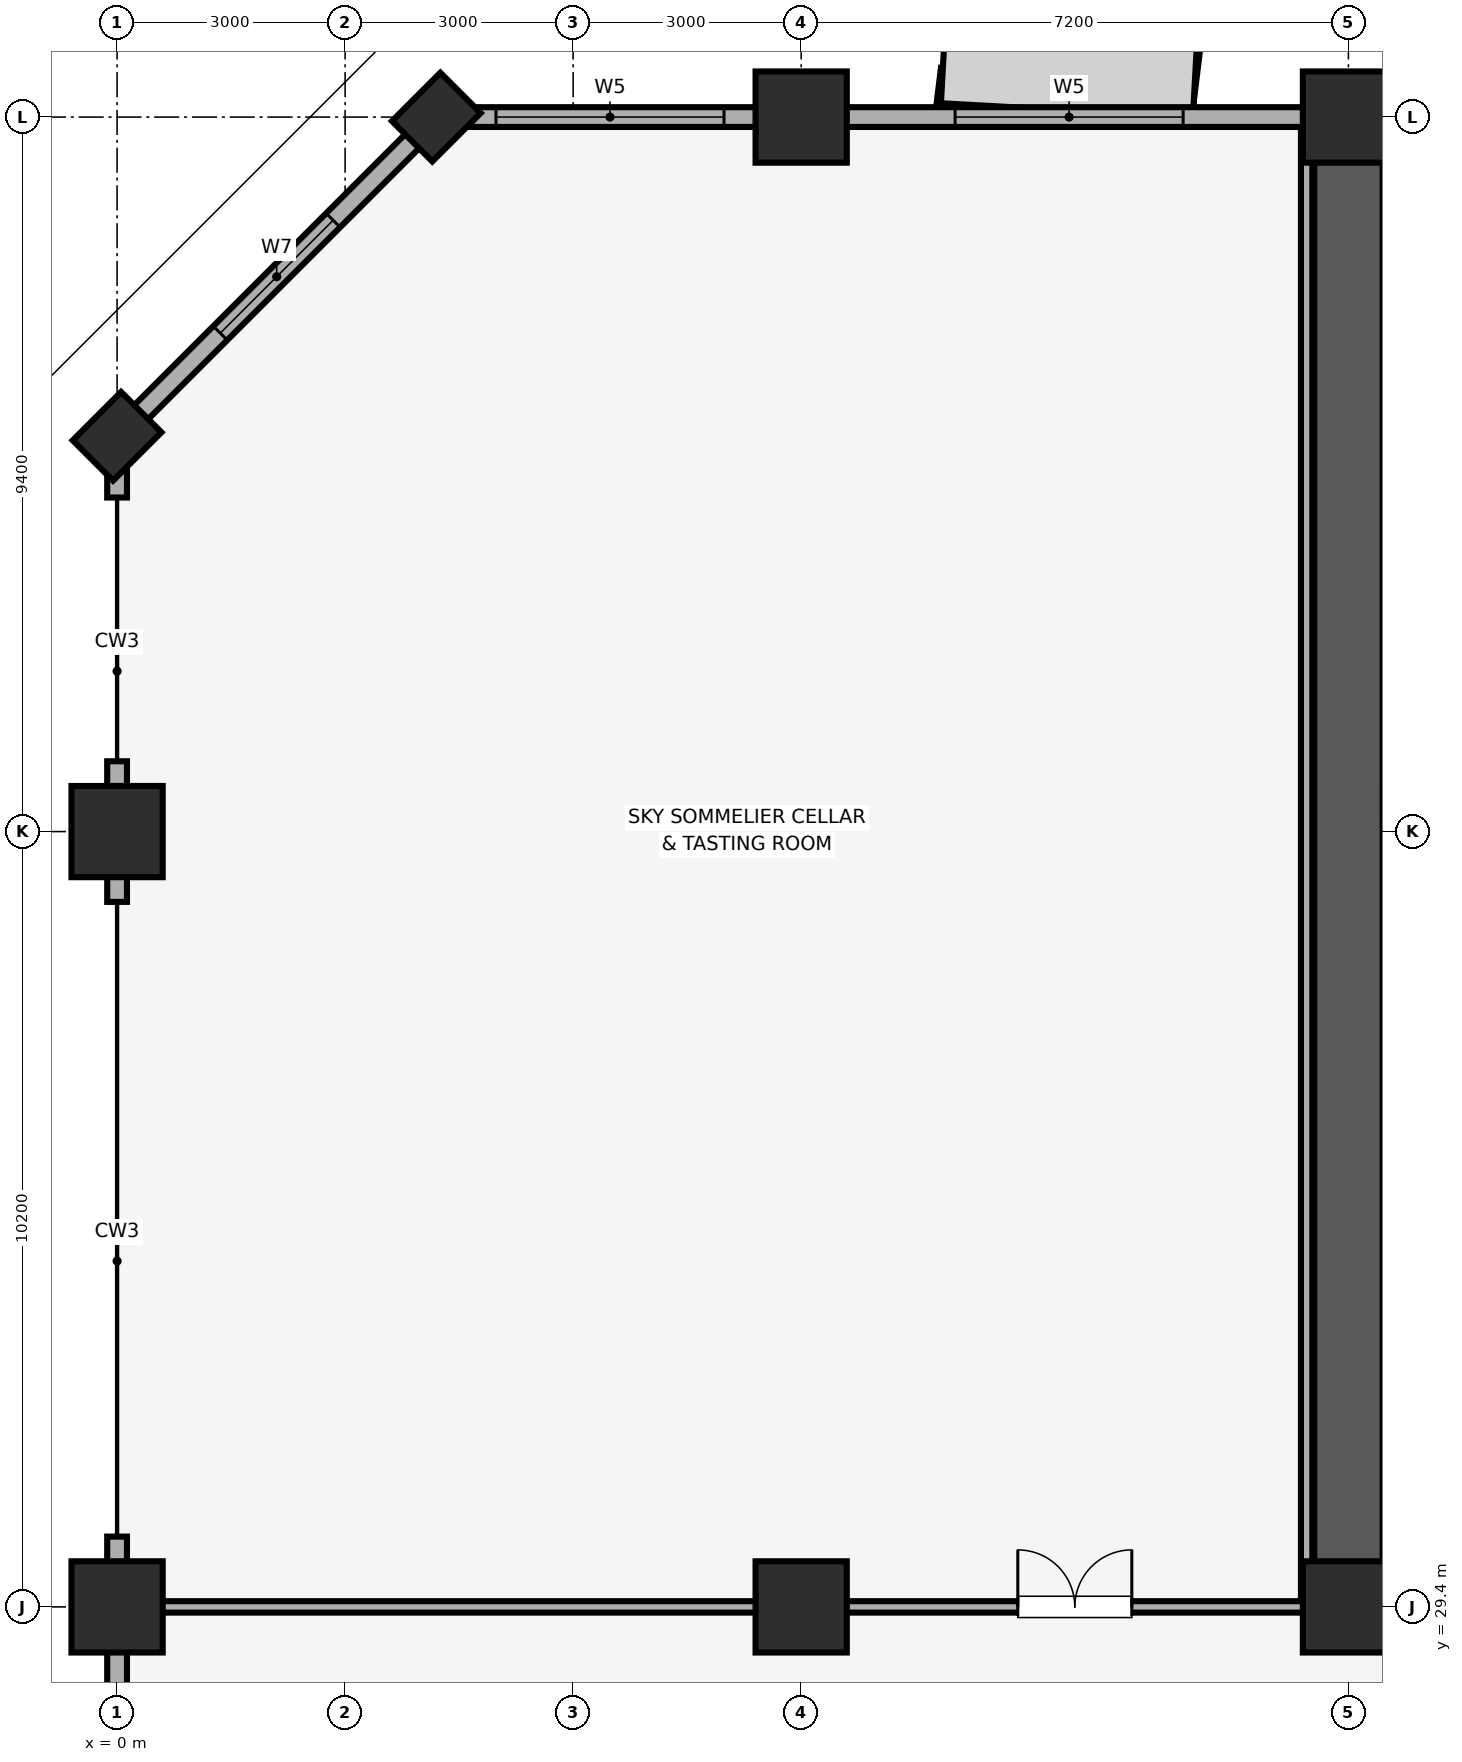
"""IFC4 building model, lengths in metres.
Left out: names, types, materials, properties, quantities, classifications, styles, units other than length and angle.
Written with IfcOpenShell. Run it as: python <this file> out.ifc"""

import sys

from ifc_helpers import new_model, si_unit, direction, frame, frame_2d, origin, origin_2d, place, context, subcontext, project, spatial, rectangle, extrude, element, fill, save


model = new_model("IFC4")
c1 = context("Model", 3, precision=1e-05, world=origin(), true_north=direction((0.0, 1.0)))
c2 = subcontext(c1, "Body", "Model", "MODEL_VIEW")
j1 = project(units=[si_unit("LENGTHUNIT", "METRE"), si_unit("PLANEANGLEUNIT", "RADIAN")], contexts=[c1])
p1 = place(None, origin())
s1 = spatial("IfcSite", under=j1, at=p1, CompositionType="ELEMENT")
p2 = place(p1, origin())
s2 = spatial("IfcBuilding", under=s1, at=p2, CompositionType="ELEMENT")
p3 = place(p2, frame((0.0, 0.0, 130.55)))
s3 = spatial("IfcBuildingStorey", under=s2, at=p3, CompositionType="ELEMENT", Elevation=130.55)
for number, where, z_axis, x_axis in (
    (1, (0.0, 29.4, 0.0), (0.0, 0.0, 1.0), (1.0, 0.0, 0.0)),
    (2, (0.0, 39.6, 0.0), (0.0, 0.0, 1.0), (1.0, 0.0, 0.0)),
):
    element("IfcColumn", number, at=place(p3, frame(where, z_axis=z_axis, x_axis=x_axis)), inside=s3, PredefinedType="COLUMN", context=c2, shape_type="SweptSolid", body=[
        extrude(rectangle(XDim=1.2, YDim=1.2, at=origin_2d()), origin(), (0.0, 0.0, 1.0), 4.56),
    ])
for number, where, z_axis, x_axis in (
    (3, (4.2, 49.0, 0.0), (0.0, 0.0, 1.0), (0.707, 0.707, 0.0)),
    (4, (0.0, 44.8, 0.0), (0.0, 0.0, 1.0), (0.707, 0.707, 0.0)),
):
    element("IfcColumn", number, at=place(p3, frame(where, z_axis=z_axis, x_axis=x_axis)), inside=s3, PredefinedType="PILASTER", context=c2, shape_type="SweptSolid", body=[
        extrude(rectangle(XDim=0.9, YDim=0.75, at=origin_2d()), origin(), (0.0, 0.0, 1.0), 4.56),
    ])
for number, where, z_axis, x_axis in (
    (5, (9.0, 29.4, 0.0), (0.0, 0.0, 1.0), (1.0, 0.0, 0.0)),
    (6, (9.0, 49.0, 0.0), (0.0, 0.0, 1.0), (1.0, 0.0, 0.0)),
    (7, (16.2, 29.4, 0.0), (0.0, 0.0, 1.0), (1.0, 0.0, 0.0)),
    (8, (16.2, 49.0, 0.0), (0.0, 0.0, 1.0), (1.0, 0.0, 0.0)),
):
    element("IfcColumn", number, at=place(p3, frame(where, z_axis=z_axis, x_axis=x_axis)), inside=s3, PredefinedType="COLUMN", context=c2, shape_type="SweptSolid", body=[
        extrude(rectangle(XDim=1.2, YDim=1.2, at=origin_2d()), origin(), (0.0, 0.0, 1.0), 4.56),
    ])
p4 = place(p3, frame((79.8, 49.0, 0.0), z_axis=(0.0, 0.0, 1.0), x_axis=(-1.0, 0.0, 0.0)))
e9 = element("IfcWall", 9, at=p4, inside=s3, PredefinedType="SOLIDWALL", context=c2, shape_type="SweptSolid", body=[
    extrude(rectangle(XDim=75.6, YDim=0.26, at=frame_2d((37.8, 0.0))), origin(), (0.0, 0.0, 1.0), 3.4),
])
p5 = place(p4, frame((71.815, 0.0, 0.85)))
e10 = element("IfcOpeningElement", 10, at=p5, cuts=e9, PredefinedType="OPENING", context=c2, shape_type="SweptSolid", body=[
    extrude(rectangle(XDim=3.0, YDim=1.5, at=frame_2d((1.5, 0.75))), frame((0.0, 0.14, 0.0), z_axis=(0.0, -1.0, 0.0), x_axis=(1.0, 0.0, 0.0)), (0.0, 0.0, 1.0), 0.28),
])
p6 = place(p4, frame((65.775, 0.0, 0.85)))
e11 = element("IfcOpeningElement", 11, at=p6, cuts=e9, PredefinedType="OPENING", context=c2, shape_type="SweptSolid", body=[
    extrude(rectangle(XDim=3.0, YDim=1.5, at=frame_2d((1.5, 0.75))), frame((0.0, 0.14, 0.0), z_axis=(0.0, -1.0, 0.0), x_axis=(1.0, 0.0, 0.0)), (0.0, 0.0, 1.0), 0.28),
])
p7 = place(p4, frame((6.825, 0.0, 0.85)))
e12 = element("IfcOpeningElement", 12, at=p7, cuts=e9, PredefinedType="OPENING", context=c2, shape_type="SweptSolid", body=[
    extrude(rectangle(XDim=3.0, YDim=1.5, at=frame_2d((1.5, 0.75))), frame((0.0, 0.14, 0.0), z_axis=(0.0, -1.0, 0.0), x_axis=(1.0, 0.0, 0.0)), (0.0, 0.0, 1.0), 0.28),
])
p8 = place(p4, frame((0.785, 0.0, 0.85)))
e13 = element("IfcOpeningElement", 13, at=p8, cuts=e9, PredefinedType="OPENING", context=c2, shape_type="SweptSolid", body=[
    extrude(rectangle(XDim=3.0, YDim=1.5, at=frame_2d((1.5, 0.75))), frame((0.0, 0.14, 0.0), z_axis=(0.0, -1.0, 0.0), x_axis=(1.0, 0.0, 0.0)), (0.0, 0.0, 1.0), 0.28),
])
p9 = place(p4, frame((50.315, 0.0, 0.9)))
e14 = element("IfcOpeningElement", 14, at=p9, cuts=e9, PredefinedType="OPENING", context=c2, shape_type="SweptSolid", body=[
    extrude(rectangle(XDim=3.6, YDim=1.5, at=frame_2d((1.8, 0.75))), frame((0.0, 0.14, 0.0), z_axis=(0.0, -1.0, 0.0), x_axis=(1.0, 0.0, 0.0)), (0.0, 0.0, 1.0), 0.28),
])
p10 = place(p4, frame((45.25, 0.0, 0.9)))
e15 = element("IfcOpeningElement", 15, at=p10, cuts=e9, PredefinedType="OPENING", context=c2, shape_type="SweptSolid", body=[
    extrude(rectangle(XDim=3.0, YDim=1.5, at=frame_2d((1.5, 0.75))), frame((0.0, 0.14, 0.0), z_axis=(0.0, -1.0, 0.0), x_axis=(1.0, 0.0, 0.0)), (0.0, 0.0, 1.0), 0.28),
])
p11 = place(p4, frame((28.1, 0.0, 0.9)))
e16 = element("IfcOpeningElement", 16, at=p11, cuts=e9, PredefinedType="OPENING", context=c2, shape_type="SweptSolid", body=[
    extrude(rectangle(XDim=3.6, YDim=1.5, at=frame_2d((1.8, 0.75))), frame((0.0, 0.14, 0.0), z_axis=(0.0, -1.0, 0.0), x_axis=(1.0, 0.0, 0.0)), (0.0, 0.0, 1.0), 0.28),
])
p12 = place(p4, frame((23.035, 0.0, 0.9)))
e17 = element("IfcOpeningElement", 17, at=p12, cuts=e9, PredefinedType="OPENING", context=c2, shape_type="SweptSolid", body=[
    extrude(rectangle(XDim=2.4, YDim=1.5, at=frame_2d((1.2, 0.75))), frame((0.0, 0.14, 0.0), z_axis=(0.0, -1.0, 0.0), x_axis=(1.0, 0.0, 0.0)), (0.0, 0.0, 1.0), 0.28),
])
p13 = place(p3, frame((4.2, 49.0, 0.0), z_axis=(0.0, 0.0, 1.0), x_axis=(-0.707106781187, -0.707106781187, 0.0)))
e18 = element("IfcWall", 18, at=p13, inside=s3, PredefinedType="SOLIDWALL", context=c2, shape_type="SweptSolid", body=[
    extrude(rectangle(XDim=5.94, YDim=0.26, at=frame_2d((2.97, 0.0))), origin(), (0.0, 0.0, 1.0), 4.52),
])
p14 = place(p13, frame((1.92, 0.0, 0.85)))
e19 = element("IfcOpeningElement", 19, at=p14, cuts=e18, PredefinedType="OPENING", context=c2, shape_type="SweptSolid", body=[
    extrude(rectangle(XDim=2.1, YDim=1.6, at=frame_2d((1.05, 0.8))), frame((0.0, 0.14, 0.0), z_axis=(0.0, -1.0, 0.0), x_axis=(1.0, 0.0, 0.0)), (0.0, 0.0, 1.0), 0.28),
])
p15 = place(p3, frame((0.0, 44.8, 0.0), z_axis=(0.0, 0.0, 1.0), x_axis=(0.0, -1.0, 0.0)))
e20 = element("IfcWall", 20, at=p15, inside=s3, PredefinedType="SOLIDWALL", context=c2, shape_type="SweptSolid", body=[
    extrude(rectangle(XDim=0.805, YDim=0.26, at=frame_2d((0.402, 0.0))), origin(), (0.0, 0.0, 1.0), 4.52),
])
p16 = place(p3, frame((0.0, 40.525, 0.0), z_axis=(0.0, 0.0, 1.0), x_axis=(0.0, -1.0, 0.0)))
e21 = element("IfcWall", 21, at=p16, inside=s3, PredefinedType="SOLIDWALL", context=c2, shape_type="SweptSolid", body=[
    extrude(rectangle(XDim=1.85, YDim=0.26, at=frame_2d((0.925, 0.0))), origin(), (0.0, 0.0, 1.0), 4.52),
])
p17 = place(p3, frame((0.0, 30.325, 0.0), z_axis=(0.0, 0.0, 1.0), x_axis=(0.0, -1.0, 0.0)))
e22 = element("IfcWall", 22, at=p17, inside=s3, PredefinedType="SOLIDWALL", context=c2, shape_type="SweptSolid", body=[
    extrude(rectangle(XDim=3.85, YDim=0.26, at=frame_2d((1.925, 0.0))), origin(), (0.0, 0.0, 1.0), 4.52),
])
p18 = place(p3, frame((16.2, 29.4, 0.0), z_axis=(0.0, 0.0, 1.0), x_axis=(0.0, 1.0, 0.0)))
e23 = element("IfcWall", 23, at=p18, inside=s3, PredefinedType="SHEAR", context=c2, shape_type="SweptSolid", body=[
    extrude(rectangle(XDim=19.2, YDim=0.9, at=frame_2d((9.6, 0.0))), origin(), (0.0, 0.0, 1.0), 4.52),
])
p19 = place(p3, frame((0.15, 29.4, 0.0), z_axis=(0.0, 0.0, 1.0), x_axis=(1.0, 0.0, 0.0)))
e24 = element("IfcWall", 24, at=p19, inside=s3, PredefinedType="PARTITIONING", context=c2, shape_type="SweptSolid", body=[
    extrude(rectangle(XDim=15.5, YDim=0.15, at=frame_2d((7.75, 0.0))), origin(), (0.0, 0.0, 1.0), 3.4),
])
p20 = place(p19, frame((11.7, 0.0, 0.0)))
e25 = element("IfcOpeningElement", 25, at=p20, cuts=e24, PredefinedType="OPENING", context=c2, shape_type="SweptSolid", body=[
    extrude(rectangle(XDim=1.5, YDim=2.25, at=frame_2d((0.75, 1.125))), frame((0.0, 0.085, 0.0), z_axis=(0.0, -1.0, 0.0), x_axis=(1.0, 0.0, 0.0)), (0.0, 0.0, 1.0), 0.17),
])
p21 = place(p3, frame((15.65, 29.48, 0.0), z_axis=(0.0, 0.0, 1.0), x_axis=(0.0, 1.0, 0.0)))
e26 = element("IfcWall", 26, at=p21, inside=s3, PredefinedType="PARTITIONING", context=c2, shape_type="SweptSolid", body=[
    extrude(rectangle(XDim=19.37, YDim=0.15, at=frame_2d((9.685, 0.0))), origin(), (0.0, 0.0, 1.0), 4.52),
])
p22 = place(p14, origin())
e27 = element("IfcWindow", 27, at=p22, inside=s3, PartitioningType="SINGLE_PANEL", PredefinedType="WINDOW", context=c2, shape_type="SweptSolid", body=[
    extrude(rectangle(XDim=2.1, YDim=1.6, at=frame_2d((1.05, 0.8))), frame((0.0, 0.03, 0.0), z_axis=(0.0, -1.0, 0.0), x_axis=(1.0, 0.0, 0.0)), (0.0, 0.0, 1.0), 0.06),
])
fill(e19, e27)
p23 = place(p5, origin())
e28 = element("IfcWindow", 28, at=p23, inside=s3, PartitioningType="SINGLE_PANEL", PredefinedType="WINDOW", context=c2, shape_type="SweptSolid", body=[
    extrude(rectangle(XDim=3.0, YDim=1.5, at=frame_2d((1.5, 0.75))), frame((0.0, 0.03, 0.0), z_axis=(0.0, -1.0, 0.0), x_axis=(1.0, 0.0, 0.0)), (0.0, 0.0, 1.0), 0.06),
])
fill(e10, e28)
p24 = place(p6, origin())
e29 = element("IfcWindow", 29, at=p24, inside=s3, PartitioningType="SINGLE_PANEL", PredefinedType="WINDOW", context=c2, shape_type="SweptSolid", body=[
    extrude(rectangle(XDim=3.0, YDim=1.5, at=frame_2d((1.5, 0.75))), frame((0.0, 0.03, 0.0), z_axis=(0.0, -1.0, 0.0), x_axis=(1.0, 0.0, 0.0)), (0.0, 0.0, 1.0), 0.06),
])
fill(e11, e29)
p25 = place(p20, origin())
e30 = element("IfcDoor", 30, at=p25, inside=s3, OperationType="DOUBLE_DOOR_SINGLE_SWING", PredefinedType="DOOR", context=c2, shape_type="SweptSolid", body=[
    extrude(rectangle(XDim=1.5, YDim=2.25, at=frame_2d((0.75, 1.125))), frame((0.0, 0.025, 0.0), z_axis=(0.0, -1.0, 0.0), x_axis=(1.0, 0.0, 0.0)), (0.0, 0.0, 1.0), 0.05),
])
fill(e25, e30)
save(model, sys.argv[1])
